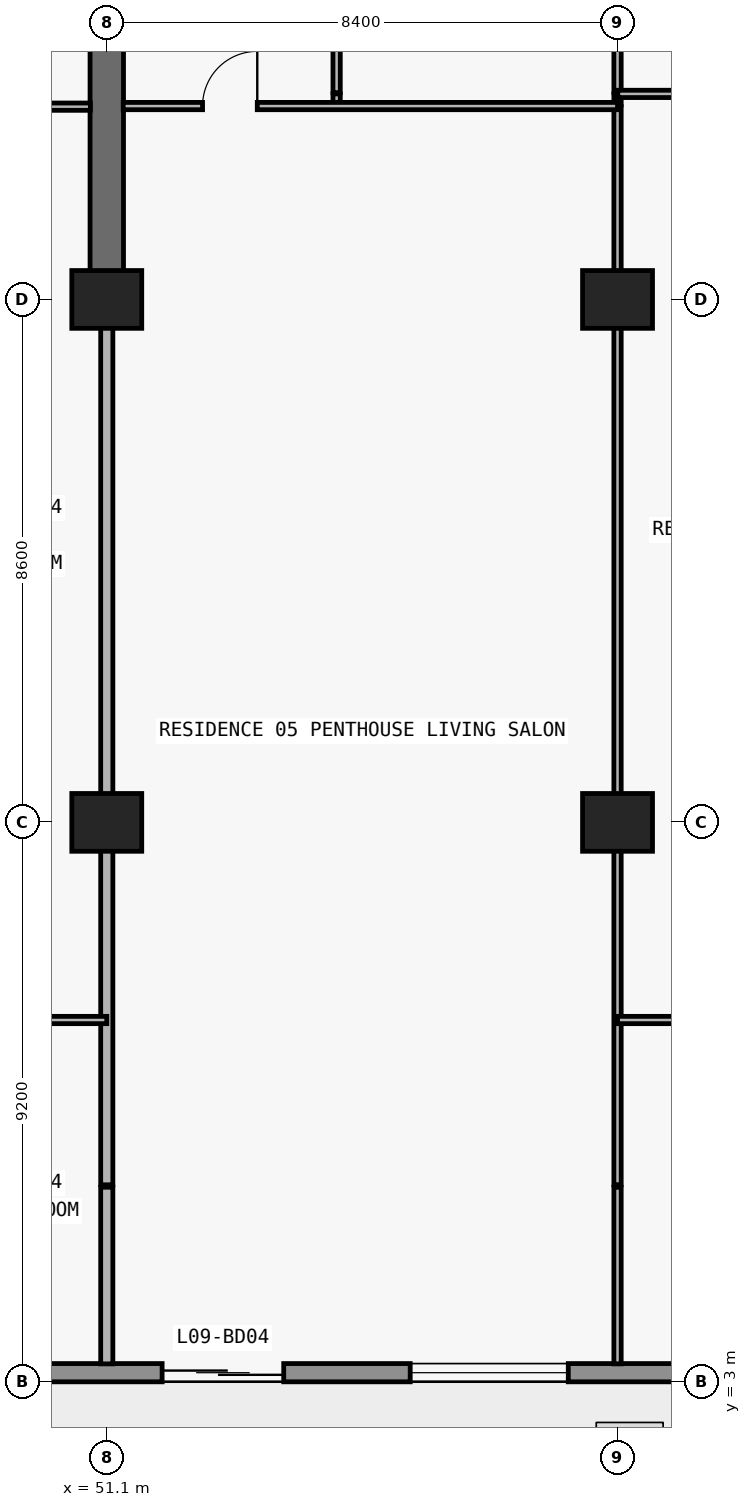
"""IFC4 building model, lengths in metres.
Left out: names, types, materials, properties, quantities, classifications, styles, units other than length and angle.
Written with IfcOpenShell. Run it as: python <this file> out.ifc"""

import sys

from ifc_helpers import new_model, si_unit, direction, frame, frame_2d, origin, origin_2d, place, context, subcontext, project, spatial, rectangle, extrude, element, fill, save


model = new_model("IFC4")
c1 = context("Model", 3, precision=1e-05, world=origin(), true_north=direction((0.0, 1.0)))
c2 = subcontext(c1, "Body", "Model", "MODEL_VIEW")
j1 = project(units=[si_unit("LENGTHUNIT", "METRE"), si_unit("PLANEANGLEUNIT", "RADIAN")], contexts=[c1])
p1 = place(None, origin())
s1 = spatial("IfcSite", under=j1, at=p1, CompositionType="ELEMENT")
p2 = place(p1, origin())
s2 = spatial("IfcBuilding", under=s1, at=p2, CompositionType="ELEMENT")
p3 = place(p2, frame((0.0, 0.0, 39.9)))
s3 = spatial("IfcBuildingStorey", under=s2, at=p3, CompositionType="ELEMENT", Elevation=39.9)
for number, where, z_axis, x_axis in (
    (1, (51.1, 12.2, 0.0), (0.0, 0.0, 1.0), (1.0, 0.0, 0.0)),
    (2, (59.5, 12.2, 0.0), (0.0, 0.0, 1.0), (1.0, 0.0, 0.0)),
    (3, (51.1, 20.8, 0.0), (0.0, 0.0, 1.0), (1.0, 0.0, 0.0)),
    (4, (59.5, 20.8, 0.0), (0.0, 0.0, 1.0), (1.0, 0.0, 0.0)),
):
    element("IfcColumn", number, at=place(p3, frame(where, z_axis=z_axis, x_axis=x_axis)), inside=s3, PredefinedType="COLUMN", context=c2, shape_type="SweptSolid", body=[
        extrude(rectangle(XDim=1.15, YDim=0.95, at=origin_2d()), origin(), (0.0, 0.0, 1.0), 3.05),
    ])
p4 = place(p3, frame((51.1, 20.8, 0.0), z_axis=(0.0, 0.0, 1.0), x_axis=(0.0, 1.0, 0.0)))
e5 = element("IfcWall", 5, at=p4, inside=s3, PredefinedType="SHEAR", context=c2, shape_type="SweptSolid", body=[
    extrude(rectangle(XDim=8.6, YDim=0.55, at=frame_2d((4.3, 0.0))), origin(), (0.0, 0.0, 1.0), 3.05),
])
p5 = place(p3, frame((72.7, 3.15, 0.0), z_axis=(0.0, 0.0, 1.0), x_axis=(-1.0, 0.0, 0.0)))
e6 = element("IfcWall", 6, at=p5, inside=s3, PredefinedType="STANDARD", context=c2, shape_type="SweptSolid", body=[
    extrude(rectangle(XDim=67.6, YDim=0.3, at=frame_2d((33.8, 0.0))), origin(), (0.0, 0.0, 1.0), 3.05),
])
p6 = place(p5, frame((59.89, 0.0, 0.0)))
e7 = element("IfcOpeningElement", 7, at=p6, cuts=e6, PredefinedType="OPENING", context=c2, shape_type="SweptSolid", body=[
    extrude(rectangle(XDim=2.0, YDim=2.3, at=frame_2d((1.0, 1.15))), frame((0.0, 0.16, 0.0), z_axis=(0.0, -1.0, 0.0), x_axis=(1.0, 0.0, 0.0)), (0.0, 0.0, 1.0), 0.32),
])
p7 = place(p5, frame((55.21, 0.0, 0.65)))
e8 = element("IfcOpeningElement", 8, at=p7, cuts=e6, PredefinedType="OPENING", context=c2, shape_type="SweptSolid", body=[
    extrude(rectangle(XDim=2.6, YDim=1.85, at=frame_2d((1.3, 0.925))), frame((0.0, 0.16, 0.0), z_axis=(0.0, -1.0, 0.0), x_axis=(1.0, 0.0, 0.0)), (0.0, 0.0, 1.0), 0.32),
])
p8 = place(p5, frame((49.1, 0.0, 0.85)))
e9 = element("IfcOpeningElement", 9, at=p8, cuts=e6, PredefinedType="OPENING", context=c2, shape_type="SweptSolid", body=[
    extrude(rectangle(XDim=2.2, YDim=1.55, at=frame_2d((1.1, 0.775))), frame((0.0, 0.16, 0.0), z_axis=(0.0, -1.0, 0.0), x_axis=(1.0, 0.0, 0.0)), (0.0, 0.0, 1.0), 0.32),
])
p9 = place(p5, frame((42.69, 0.0, 0.0)))
e10 = element("IfcOpeningElement", 10, at=p9, cuts=e6, PredefinedType="OPENING", context=c2, shape_type="SweptSolid", body=[
    extrude(rectangle(XDim=2.0, YDim=2.3, at=frame_2d((1.0, 1.15))), frame((0.0, 0.16, 0.0), z_axis=(0.0, -1.0, 0.0), x_axis=(1.0, 0.0, 0.0)), (0.0, 0.0, 1.0), 0.32),
])
p10 = place(p5, frame((38.59, 0.0, 0.85)))
e11 = element("IfcOpeningElement", 11, at=p10, cuts=e6, PredefinedType="OPENING", context=c2, shape_type="SweptSolid", body=[
    extrude(rectangle(XDim=1.8, YDim=1.55, at=frame_2d((0.9, 0.775))), frame((0.0, 0.16, 0.0), z_axis=(0.0, -1.0, 0.0), x_axis=(1.0, 0.0, 0.0)), (0.0, 0.0, 1.0), 0.32),
])
p11 = place(p5, frame((30.914, 0.0, 0.85)))
e12 = element("IfcOpeningElement", 12, at=p11, cuts=e6, PredefinedType="OPENING", context=c2, shape_type="SweptSolid", body=[
    extrude(rectangle(XDim=2.2, YDim=1.55, at=frame_2d((1.1, 0.775))), frame((0.0, 0.16, 0.0), z_axis=(0.0, -1.0, 0.0), x_axis=(1.0, 0.0, 0.0)), (0.0, 0.0, 1.0), 0.32),
])
p12 = place(p5, frame((26.69, 0.0, 0.0)))
e13 = element("IfcOpeningElement", 13, at=p12, cuts=e6, PredefinedType="OPENING", context=c2, shape_type="SweptSolid", body=[
    extrude(rectangle(XDim=2.0, YDim=2.3, at=frame_2d((1.0, 1.15))), frame((0.0, 0.16, 0.0), z_axis=(0.0, -1.0, 0.0), x_axis=(1.0, 0.0, 0.0)), (0.0, 0.0, 1.0), 0.32),
])
p13 = place(p5, frame((22.59, 0.0, 0.85)))
e14 = element("IfcOpeningElement", 14, at=p13, cuts=e6, PredefinedType="OPENING", context=c2, shape_type="SweptSolid", body=[
    extrude(rectangle(XDim=1.8, YDim=1.55, at=frame_2d((0.9, 0.775))), frame((0.0, 0.16, 0.0), z_axis=(0.0, -1.0, 0.0), x_axis=(1.0, 0.0, 0.0)), (0.0, 0.0, 1.0), 0.32),
])
p14 = place(p5, frame((18.69, 0.0, 0.0)))
e15 = element("IfcOpeningElement", 15, at=p14, cuts=e6, PredefinedType="OPENING", context=c2, shape_type="SweptSolid", body=[
    extrude(rectangle(XDim=2.0, YDim=2.3, at=frame_2d((1.0, 1.15))), frame((0.0, 0.16, 0.0), z_axis=(0.0, -1.0, 0.0), x_axis=(1.0, 0.0, 0.0)), (0.0, 0.0, 1.0), 0.32),
])
p15 = place(p5, frame((14.01, 0.0, 0.65)))
e16 = element("IfcOpeningElement", 16, at=p15, cuts=e6, PredefinedType="OPENING", context=c2, shape_type="SweptSolid", body=[
    extrude(rectangle(XDim=2.6, YDim=1.85, at=frame_2d((1.3, 0.925))), frame((0.0, 0.16, 0.0), z_axis=(0.0, -1.0, 0.0), x_axis=(1.0, 0.0, 0.0)), (0.0, 0.0, 1.0), 0.32),
])
p16 = place(p5, frame((7.9, 0.0, 0.85)))
e17 = element("IfcOpeningElement", 17, at=p16, cuts=e6, PredefinedType="OPENING", context=c2, shape_type="SweptSolid", body=[
    extrude(rectangle(XDim=2.2, YDim=1.55, at=frame_2d((1.1, 0.775))), frame((0.0, 0.16, 0.0), z_axis=(0.0, -1.0, 0.0), x_axis=(1.0, 0.0, 0.0)), (0.0, 0.0, 1.0), 0.32),
])
p17 = place(p3, frame((51.1, 3.295, 0.0), z_axis=(0.0, 0.0, 1.0), x_axis=(0.0, 1.0, 0.0)))
e18 = element("IfcWall", 18, at=p17, inside=s3, PredefinedType="PARTITIONING", context=c2, shape_type="SweptSolid", body=[
    extrude(rectangle(XDim=2.905, YDim=0.2, at=frame_2d((1.453, 0.0))), origin(), (0.0, 0.0, 1.0), 3.05),
])
p18 = place(p3, frame((51.1, 6.24, 0.0), z_axis=(0.0, 0.0, 1.0), x_axis=(0.0, 1.0, 0.0)))
e19 = element("IfcWall", 19, at=p18, inside=s3, PredefinedType="PARTITIONING", context=c2, shape_type="SweptSolid", body=[
    extrude(rectangle(XDim=14.555, YDim=0.2, at=frame_2d((7.277, 0.0))), origin(), (0.0, 0.0, 1.0), 2.11),
])
p19 = place(p3, frame((54.88, 24.0, 0.0), z_axis=(0.0, 0.0, 1.0), x_axis=(0.0, 1.0, 0.0)))
e20 = element("IfcWall", 20, at=p19, inside=s3, PredefinedType="PARTITIONING", context=c2, shape_type="SweptSolid", body=[
    extrude(rectangle(XDim=0.18, YDim=0.12, at=frame_2d((0.09, 0.0))), origin(), (0.0, 0.0, 1.0), 3.05),
])
p20 = place(p3, frame((54.88, 24.2, 0.0), z_axis=(0.0, 0.0, 1.0), x_axis=(0.0, 1.0, 0.0)))
e21 = element("IfcWall", 21, at=p20, inside=s3, PredefinedType="PARTITIONING", context=c2, shape_type="SweptSolid", body=[
    extrude(rectangle(XDim=4.38, YDim=0.12, at=frame_2d((2.19, 0.0))), origin(), (0.0, 0.0, 1.0), 3.05),
])
p21 = place(p20, frame((1.74, 0.0, 0.0)))
e22 = element("IfcOpeningElement", 22, at=p21, cuts=e21, PredefinedType="OPENING", context=c2, shape_type="SweptSolid", body=[
    extrude(rectangle(XDim=0.9, YDim=2.15, at=frame_2d((0.45, 1.075))), frame((0.0, 0.07, 0.0), z_axis=(0.0, -1.0, 0.0), x_axis=(1.0, 0.0, 0.0)), (0.0, 0.0, 1.0), 0.14),
])
p22 = place(p3, frame((59.5, 3.295, 0.0), z_axis=(0.0, 0.0, 1.0), x_axis=(0.0, 1.0, 0.0)))
e23 = element("IfcWall", 23, at=p22, inside=s3, PredefinedType="PARTITIONING", context=c2, shape_type="SweptSolid", body=[
    extrude(rectangle(XDim=2.905, YDim=0.12, at=frame_2d((1.453, 0.0))), origin(), (0.0, 0.0, 1.0), 3.05),
])
p23 = place(p3, frame((59.5, 6.24, 0.0), z_axis=(0.0, 0.0, 1.0), x_axis=(0.0, 1.0, 0.0)))
e24 = element("IfcWall", 24, at=p23, inside=s3, PredefinedType="PARTITIONING", context=c2, shape_type="SweptSolid", body=[
    extrude(rectangle(XDim=17.73, YDim=0.12, at=frame_2d((8.865, 0.0))), origin(), (0.0, 0.0, 1.0), 2.11),
])
p24 = place(p3, frame((59.5, 24.0, 0.0), z_axis=(0.0, 0.0, 1.0), x_axis=(0.0, 1.0, 0.0)))
e25 = element("IfcWall", 25, at=p24, inside=s3, PredefinedType="PARTITIONING", context=c2, shape_type="SweptSolid", body=[
    extrude(rectangle(XDim=0.18, YDim=0.12, at=frame_2d((0.09, 0.0))), origin(), (0.0, 0.0, 1.0), 2.11),
])
p25 = place(p3, frame((59.5, 24.2, 0.0), z_axis=(0.0, 0.0, 1.0), x_axis=(0.0, 1.0, 0.0)))
e26 = element("IfcWall", 26, at=p25, inside=s3, PredefinedType="PARTITIONING", context=c2, shape_type="SweptSolid", body=[
    extrude(rectangle(XDim=4.38, YDim=0.12, at=frame_2d((2.19, 0.0))), origin(), (0.0, 0.0, 1.0), 2.11),
])
p26 = place(p25, frame((1.74, 0.0, 0.0)))
e27 = element("IfcOpeningElement", 27, at=p26, cuts=e26, PredefinedType="OPENING", context=c2, shape_type="SweptSolid", body=[
    extrude(rectangle(XDim=0.9, YDim=2.06, at=frame_2d((0.45, 1.03))), frame((0.0, 0.07, 0.0), z_axis=(0.0, -1.0, 0.0), x_axis=(1.0, 0.0, 0.0)), (0.0, 0.0, 1.0), 0.14),
])
p27 = place(p3, frame((47.32, 8.95, 0.0), z_axis=(0.0, 0.0, 1.0), x_axis=(1.0, 0.0, 0.0)))
e28 = element("IfcWall", 28, at=p27, inside=s3, PredefinedType="PARTITIONING", context=c2, shape_type="SweptSolid", body=[
    extrude(rectangle(XDim=3.78, YDim=0.12, at=frame_2d((1.89, 0.0))), origin(), (0.0, 0.0, 1.0), 3.05),
])
p28 = place(p27, frame((1.44, 0.0, 0.0)))
e29 = element("IfcOpeningElement", 29, at=p28, cuts=e28, PredefinedType="OPENING", context=c2, shape_type="SweptSolid", body=[
    extrude(rectangle(XDim=0.9, YDim=2.15, at=frame_2d((0.45, 1.075))), frame((0.0, 0.07, 0.0), z_axis=(0.0, -1.0, 0.0), x_axis=(1.0, 0.0, 0.0)), (0.0, 0.0, 1.0), 0.14),
])
p29 = place(p3, frame((59.5, 8.95, 0.0), z_axis=(0.0, 0.0, 1.0), x_axis=(1.0, 0.0, 0.0)))
e30 = element("IfcWall", 30, at=p29, inside=s3, PredefinedType="PARTITIONING", context=c2, shape_type="SweptSolid", body=[
    extrude(rectangle(XDim=8.4, YDim=0.12, at=frame_2d((4.2, 0.0))), origin(), (0.0, 0.0, 1.0), 3.05),
])
p30 = place(p29, frame((3.75, 0.0, 0.0)))
e31 = element("IfcOpeningElement", 31, at=p30, cuts=e30, PredefinedType="OPENING", context=c2, shape_type="SweptSolid", body=[
    extrude(rectangle(XDim=0.9, YDim=2.15, at=frame_2d((0.45, 1.075))), frame((0.0, 0.07, 0.0), z_axis=(0.0, -1.0, 0.0), x_axis=(1.0, 0.0, 0.0)), (0.0, 0.0, 1.0), 0.14),
])
p31 = place(p3, frame((42.7, 23.97, 0.0), z_axis=(0.0, 0.0, 1.0), x_axis=(1.0, 0.0, 0.0)))
e32 = element("IfcWall", 32, at=p31, inside=s3, PredefinedType="PARTITIONING", context=c2, shape_type="SweptSolid", body=[
    extrude(rectangle(XDim=8.13, YDim=0.12, at=frame_2d((4.065, 0.0))), origin(), (0.0, 0.0, 1.0), 3.05),
])
p32 = place(p31, frame((1.86, 0.0, 0.0)))
e33 = element("IfcOpeningElement", 33, at=p32, cuts=e32, PredefinedType="OPENING", context=c2, shape_type="SweptSolid", body=[
    extrude(rectangle(XDim=0.9, YDim=2.15, at=frame_2d((0.45, 1.075))), frame((0.0, 0.07, 0.0), z_axis=(0.0, -1.0, 0.0), x_axis=(1.0, 0.0, 0.0)), (0.0, 0.0, 1.0), 0.14),
])
p33 = place(p31, frame((6.008, 0.0, 0.0)))
e34 = element("IfcOpeningElement", 34, at=p33, cuts=e32, PredefinedType="OPENING", context=c2, shape_type="SweptSolid", body=[
    extrude(rectangle(XDim=0.9, YDim=2.15, at=frame_2d((0.45, 1.075))), frame((0.0, 0.07, 0.0), z_axis=(0.0, -1.0, 0.0), x_axis=(1.0, 0.0, 0.0)), (0.0, 0.0, 1.0), 0.14),
])
p34 = place(p3, frame((51.37, 23.98, 0.0), z_axis=(0.0, 0.0, 1.0), x_axis=(1.0, 0.0, 0.0)))
e35 = element("IfcWall", 35, at=p34, inside=s3, PredefinedType="PARTITIONING", context=c2, shape_type="SweptSolid", body=[
    extrude(rectangle(XDim=8.13, YDim=0.12, at=frame_2d((4.065, 0.0))), origin(), (0.0, 0.0, 1.0), 3.05),
])
p35 = place(p34, frame((1.305, 0.0, 0.0)))
e36 = element("IfcOpeningElement", 36, at=p35, cuts=e35, PredefinedType="OPENING", context=c2, shape_type="SweptSolid", body=[
    extrude(rectangle(XDim=0.9, YDim=2.15, at=frame_2d((0.45, 1.075))), frame((0.0, 0.07, 0.0), z_axis=(0.0, -1.0, 0.0), x_axis=(1.0, 0.0, 0.0)), (0.0, 0.0, 1.0), 0.14),
])
p36 = place(p3, frame((59.505, 24.18, 0.0), z_axis=(0.0, 0.0, 1.0), x_axis=(1.0, 0.0, 0.0)))
e37 = element("IfcWall", 37, at=p36, inside=s3, PredefinedType="PARTITIONING", context=c2, shape_type="SweptSolid", body=[
    extrude(rectangle(XDim=8.395, YDim=0.12, at=frame_2d((4.198, 0.0))), origin(), (0.0, 0.0, 1.0), 3.05),
])
p37 = place(p36, frame((3.748, 0.0, 0.0)))
e38 = element("IfcOpeningElement", 38, at=p37, cuts=e37, PredefinedType="OPENING", context=c2, shape_type="SweptSolid", body=[
    extrude(rectangle(XDim=0.9, YDim=2.15, at=frame_2d((0.45, 1.075))), frame((0.0, 0.07, 0.0), z_axis=(0.0, -1.0, 0.0), x_axis=(1.0, 0.0, 0.0)), (0.0, 0.0, 1.0), 0.14),
])
p38 = place(p14, origin())
e39 = element("IfcDoor", 39, at=p38, inside=s3, OperationType="DOUBLE_DOOR_SLIDING", PredefinedType="DOOR", context=c2, shape_type="SweptSolid", body=[
    extrude(rectangle(XDim=2.0, YDim=2.3, at=frame_2d((1.0, 1.15))), frame((0.0, 0.025, 0.0), z_axis=(0.0, -1.0, 0.0), x_axis=(1.0, 0.0, 0.0)), (0.0, 0.0, 1.0), 0.05),
])
fill(e15, e39)
p39 = place(p15, origin())
e40 = element("IfcWindow", 40, at=p39, inside=s3, PartitioningType="SINGLE_PANEL", PredefinedType="WINDOW", context=c2, shape_type="SweptSolid", body=[
    extrude(rectangle(XDim=2.6, YDim=1.85, at=frame_2d((1.3, 0.925))), frame((0.0, 0.03, 0.0), z_axis=(0.0, -1.0, 0.0), x_axis=(1.0, 0.0, 0.0)), (0.0, 0.0, 1.0), 0.06),
])
fill(e16, e40)
p40 = place(p35, origin())
e41 = element("IfcDoor", 41, at=p40, inside=s3, OperationType="SINGLE_SWING_RIGHT", PredefinedType="DOOR", context=c2, shape_type="SweptSolid", body=[
    extrude(rectangle(XDim=0.9, YDim=2.15, at=frame_2d((0.45, 1.075))), frame((0.0, 0.025, 0.0), z_axis=(0.0, -1.0, 0.0), x_axis=(1.0, 0.0, 0.0)), (0.0, 0.0, 1.0), 0.05),
])
fill(e36, e41)
save(model, sys.argv[1])
